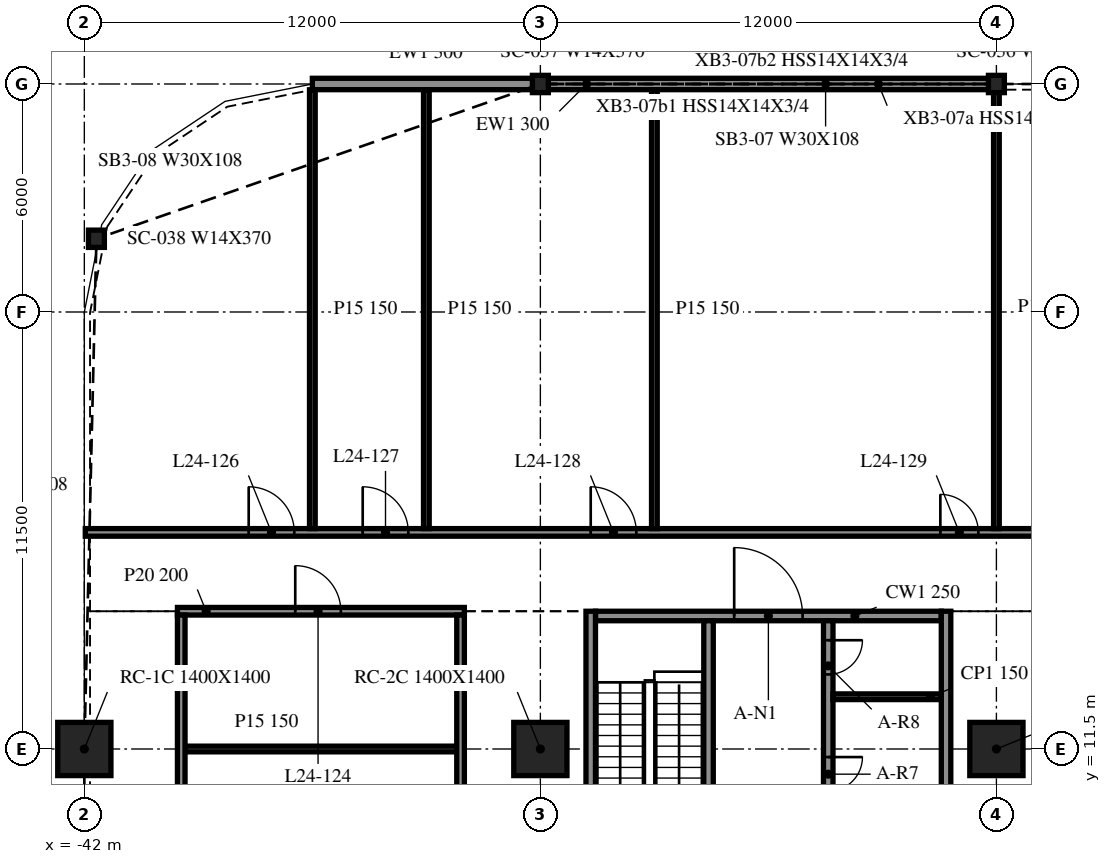
"""IFC4 building model, lengths in metres.
Left out: names, types, materials, properties, quantities, classifications, styles, units other than length and angle.
Written with IfcOpenShell. Run it as: python <this file> out.ifc"""

import sys

from ifc_helpers import new_model, si_unit, direction, frame, frame_2d, origin, origin_2d, place, context, subcontext, project, spatial, rectangle, i_section, extrude, element, fill, save


model = new_model("IFC4")
c1 = context("Model", 3, precision=1e-05, world=origin(), true_north=direction((0.0, 1.0)))
c2 = subcontext(c1, "Body", "Model", "MODEL_VIEW")
j1 = project(units=[si_unit("LENGTHUNIT", "METRE"), si_unit("PLANEANGLEUNIT", "RADIAN")], contexts=[c1])
p1 = place(None, origin())
s1 = spatial("IfcSite", under=j1, at=p1, CompositionType="ELEMENT")
p2 = place(p1, origin())
s2 = spatial("IfcBuilding", under=s1, at=p2, CompositionType="ELEMENT")
p3 = place(p2, frame((0.0, 0.0, 105.3)))
s3 = spatial("IfcBuildingStorey", under=s2, at=p3, CompositionType="ELEMENT", Elevation=105.3)
for number, where, z_axis, x_axis in (
    (1, (-42.0, 11.5, -0.34), (0.0, 0.0, 1.0), (1.0, 0.0, 0.0)),
    (2, (-30.0, 11.5, -0.34), (0.0, 0.0, 1.0), (1.0, 0.0, 0.0)),
    (3, (-18.0, 11.5, -0.34), (0.0, 0.0, 1.0), (1.0, 0.0, 0.0)),
):
    element("IfcColumn", number, at=place(p3, frame(where, z_axis=z_axis, x_axis=x_axis)), inside=s3, PredefinedType="COLUMN", context=c2, shape_type="SweptSolid", body=[
        extrude(rectangle(XDim=1.4, YDim=1.4, at=origin_2d()), origin(), (0.0, 0.0, 1.0), 4.1),
    ])
for number, where, z_axis, x_axis in (
    (4, (-18.0, 29.0, -0.34), (0.0, 0.0, 1.0), (1.0, 0.0, 0.0)),
    (5, (-30.0, 29.0, -0.34), (0.0, 0.0, 1.0), (1.0, 0.0, 0.0)),
    (6, (-41.682, 24.927, -0.34), (0.0, 0.0, 1.0), (1.0, 0.0, 0.0)),
):
    element("IfcColumn", number, at=place(p3, frame(where, z_axis=z_axis, x_axis=x_axis)), inside=s3, PredefinedType="COLUMN", context=c2, shape_type="SweptSolid", body=[
        extrude(i_section(OverallWidth=0.419, OverallDepth=0.455, WebThickness=0.042, FlangeThickness=0.068, at=origin_2d()), origin(), (0.0, 0.0, 1.0), 4.1),
    ])
p4 = place(p3, frame((-18.021, 29.0, 0.0), z_axis=(0.0, 0.0, 1.0), x_axis=(-1.0, 0.0, 0.0)))
e7 = element("IfcWall", 7, at=p4, inside=s3, PredefinedType="NOTDEFINED", context=c2, shape_type="SweptSolid", body=[
    extrude(rectangle(XDim=11.958, YDim=0.3, at=frame_2d((5.979, 0.0))), origin(), (0.0, 0.0, 1.0), 3.003),
])
p5 = place(p3, frame((-30.021, 29.0, 0.0), z_axis=(0.0, 0.0, 1.0), x_axis=(-1.0, 0.0, 0.0)))
e8 = element("IfcWall", 8, at=p5, inside=s3, PredefinedType="NOTDEFINED", context=c2, shape_type="SweptSolid", body=[
    extrude(rectangle(XDim=5.979, YDim=0.3, at=frame_2d((2.99, 0.0))), origin(), (0.0, 0.0, 1.0), 3.003),
])
for number, where, z_axis, x_axis in (
    (9, (-28.675, 15.125, 0.0), (0.0, 0.0, 1.0), (0.0, -1.0, 0.0)),
    (10, (-19.325, -9.125, 0.0), (0.0, 0.0, 1.0), (0.0, 1.0, 0.0)),
):
    element("IfcWall", number, at=place(p3, frame(where, z_axis=z_axis, x_axis=x_axis)), inside=s3, PredefinedType="SOLIDWALL", context=c2, shape_type="SweptSolid", body=[
        extrude(rectangle(XDim=24.25, YDim=0.25, at=frame_2d((12.125, 0.0))), origin(), (0.0, 0.0, 1.0), 3.76),
    ])
p6 = place(p3, frame((-28.55, 15.0, 0.0), z_axis=(0.0, 0.0, 1.0), x_axis=(1.0, 0.0, 0.0)))
e11 = element("IfcWall", 11, at=p6, inside=s3, PredefinedType="SOLIDWALL", context=c2, shape_type="SweptSolid", body=[
    extrude(rectangle(XDim=9.1, YDim=0.25, at=frame_2d((4.55, 0.0))), origin(), (0.0, 0.0, 1.0), 3.76),
])
p7 = place(p6, frame((3.65, 0.0, 0.0)))
e12 = element("IfcOpeningElement", 12, at=p7, cuts=e11, PredefinedType="OPENING", context=c2, shape_type="SweptSolid", body=[
    extrude(rectangle(XDim=1.8, YDim=2.1, at=frame_2d((0.9, 1.05))), frame((0.0, 0.135, 0.0), z_axis=(0.0, -1.0, 0.0), x_axis=(1.0, 0.0, 0.0)), (0.0, 0.0, 1.0), 0.27),
])
p8 = place(p3, frame((-25.575, 14.875, 0.0), z_axis=(0.0, 0.0, 1.0), x_axis=(0.0, -1.0, 0.0)))
e13 = element("IfcWall", 13, at=p8, inside=s3, PredefinedType="SOLIDWALL", context=c2, shape_type="SweptSolid", body=[
    extrude(rectangle(XDim=6.25, YDim=0.25, at=frame_2d((3.125, 0.0))), origin(), (0.0, 0.0, 1.0), 3.76),
])
p9 = place(p8, frame((4.85, 0.0, 0.0)))
e14 = element("IfcOpeningElement", 14, at=p9, cuts=e13, PredefinedType="OPENING", context=c2, shape_type="SweptSolid", body=[
    extrude(rectangle(XDim=1.0, YDim=2.1, at=frame_2d((0.5, 1.05))), frame((0.0, 0.135, 0.0), z_axis=(0.0, -1.0, 0.0), x_axis=(1.0, 0.0, 0.0)), (0.0, 0.0, 1.0), 0.27),
])
p10 = place(p3, frame((-22.425, 14.875, 0.0), z_axis=(0.0, 0.0, 1.0), x_axis=(0.0, -1.0, 0.0)))
e15 = element("IfcWall", 15, at=p10, inside=s3, PredefinedType="SOLIDWALL", context=c2, shape_type="SweptSolid", body=[
    extrude(rectangle(XDim=23.75, YDim=0.25, at=frame_2d((11.875, 0.0))), origin(), (0.0, 0.0, 1.0), 3.76),
])
p11 = place(p10, frame((15.45, 0.0, 0.0)))
e16 = element("IfcOpeningElement", 16, at=p11, cuts=e15, PredefinedType="OPENING", context=c2, shape_type="SweptSolid", body=[
    extrude(rectangle(XDim=1.1, YDim=2.1, at=frame_2d((0.55, 1.05))), frame((0.0, 0.135, 0.0), z_axis=(0.0, -1.0, 0.0), x_axis=(1.0, 0.0, 0.0)), (0.0, 0.0, 1.0), 0.27),
])
p12 = place(p10, frame((12.7, 0.0, 0.0)))
e17 = element("IfcOpeningElement", 17, at=p12, cuts=e15, PredefinedType="OPENING", context=c2, shape_type="SweptSolid", body=[
    extrude(rectangle(XDim=1.1, YDim=2.1, at=frame_2d((0.55, 1.05))), frame((0.0, 0.135, 0.0), z_axis=(0.0, -1.0, 0.0), x_axis=(1.0, 0.0, 0.0)), (0.0, 0.0, 1.0), 0.27),
])
p13 = place(p10, frame((22.337, 0.0, 0.0)))
e18 = element("IfcOpeningElement", 18, at=p13, cuts=e15, PredefinedType="OPENING", context=c2, shape_type="SweptSolid", body=[
    extrude(rectangle(XDim=0.9, YDim=2.1, at=frame_2d((0.45, 1.05))), frame((0.0, 0.135, 0.0), z_axis=(0.0, -1.0, 0.0), x_axis=(1.0, 0.0, 0.0)), (0.0, 0.0, 1.0), 0.27),
])
p14 = place(p10, frame((20.3, 0.0, 0.0)))
e19 = element("IfcOpeningElement", 19, at=p14, cuts=e15, PredefinedType="OPENING", context=c2, shape_type="SweptSolid", body=[
    extrude(rectangle(XDim=0.9, YDim=2.1, at=frame_2d((0.45, 1.05))), frame((0.0, 0.135, 0.0), z_axis=(0.0, -1.0, 0.0), x_axis=(1.0, 0.0, 0.0)), (0.0, 0.0, 1.0), 0.27),
])
p15 = place(p10, frame((18.262, 0.0, 0.0)))
e20 = element("IfcOpeningElement", 20, at=p15, cuts=e15, PredefinedType="OPENING", context=c2, shape_type="SweptSolid", body=[
    extrude(rectangle(XDim=0.9, YDim=2.1, at=frame_2d((0.45, 1.05))), frame((0.0, 0.135, 0.0), z_axis=(0.0, -1.0, 0.0), x_axis=(1.0, 0.0, 0.0)), (0.0, 0.0, 1.0), 0.27),
])
p16 = place(p10, frame((3.587, 0.0, 0.0)))
e21 = element("IfcOpeningElement", 21, at=p16, cuts=e15, PredefinedType="OPENING", context=c2, shape_type="SweptSolid", body=[
    extrude(rectangle(XDim=0.9, YDim=2.1, at=frame_2d((0.45, 1.05))), frame((0.0, 0.135, 0.0), z_axis=(0.0, -1.0, 0.0), x_axis=(1.0, 0.0, 0.0)), (0.0, 0.0, 1.0), 0.27),
])
p17 = place(p10, frame((0.512, 0.0, 0.0)))
e22 = element("IfcOpeningElement", 22, at=p17, cuts=e15, PredefinedType="OPENING", context=c2, shape_type="SweptSolid", body=[
    extrude(rectangle(XDim=0.9, YDim=2.1, at=frame_2d((0.45, 1.05))), frame((0.0, 0.135, 0.0), z_axis=(0.0, -1.0, 0.0), x_axis=(1.0, 0.0, 0.0)), (0.0, 0.0, 1.0), 0.27),
])
p18 = place(p3, frame((-22.3, 12.875, 0.0), z_axis=(0.0, 0.0, 1.0), x_axis=(1.0, 0.0, 0.0)))
e23 = element("IfcWall", 23, at=p18, inside=s3, PredefinedType="PARTITIONING", context=c2, shape_type="SweptSolid", body=[
    extrude(rectangle(XDim=2.85, YDim=0.15, at=frame_2d((1.425, 0.0))), origin(), (0.0, 0.0, 1.0), 3.76),
])
p19 = place(p3, frame((-39.35, 11.5, 0.0), z_axis=(0.0, 0.0, 1.0), x_axis=(1.0, 0.0, 0.0)))
e24 = element("IfcWall", 24, at=p19, inside=s3, PredefinedType="PARTITIONING", context=c2, shape_type="SweptSolid", body=[
    extrude(rectangle(XDim=7.15, YDim=0.15, at=frame_2d((3.575, 0.0))), origin(), (0.0, 0.0, 1.0), 3.76),
])
p20 = place(p3, frame((-39.55, 15.125, 0.0), z_axis=(0.0, 0.0, 1.0), x_axis=(1.0, 0.0, 0.0)))
e25 = element("IfcWall", 25, at=p20, inside=s3, PredefinedType="PARTITIONING", context=c2, shape_type="SweptSolid", body=[
    extrude(rectangle(XDim=7.55, YDim=0.2, at=frame_2d((3.775, 0.0))), origin(), (0.0, 0.0, 1.0), 3.76),
])
p21 = place(p20, frame((3.1, 0.0, 0.0)))
e26 = element("IfcOpeningElement", 26, at=p21, cuts=e25, PredefinedType="OPENING", context=c2, shape_type="SweptSolid", body=[
    extrude(rectangle(XDim=1.2, YDim=2.1, at=frame_2d((0.6, 1.05))), frame((0.0, 0.11, 0.0), z_axis=(0.0, -1.0, 0.0), x_axis=(1.0, 0.0, 0.0)), (0.0, 0.0, 1.0), 0.22),
])
p22 = place(p3, frame((-41.975, 17.2, 0.0), z_axis=(0.0, 0.0, 1.0), x_axis=(1.0, 0.0, 0.0)))
e27 = element("IfcWall", 27, at=p22, inside=s3, PredefinedType="PARTITIONING", context=c2, shape_type="SweptSolid", body=[
    extrude(rectangle(XDim=95.95, YDim=0.2, at=frame_2d((47.975, 0.0))), origin(), (0.0, 0.0, 1.0), 3.76),
])
p23 = place(p22, frame((4.3, 0.0, 0.0)))
e28 = element("IfcOpeningElement", 28, at=p23, cuts=e27, PredefinedType="OPENING", context=c2, shape_type="SweptSolid", body=[
    extrude(rectangle(XDim=1.2, YDim=2.1, at=frame_2d((0.6, 1.05))), frame((0.0, 0.11, 0.0), z_axis=(0.0, -1.0, 0.0), x_axis=(1.0, 0.0, 0.0)), (0.0, 0.0, 1.0), 0.22),
])
p24 = place(p22, frame((7.3, 0.0, 0.0)))
e29 = element("IfcOpeningElement", 29, at=p24, cuts=e27, PredefinedType="OPENING", context=c2, shape_type="SweptSolid", body=[
    extrude(rectangle(XDim=1.2, YDim=2.1, at=frame_2d((0.6, 1.05))), frame((0.0, 0.11, 0.0), z_axis=(0.0, -1.0, 0.0), x_axis=(1.0, 0.0, 0.0)), (0.0, 0.0, 1.0), 0.22),
])
p25 = place(p22, frame((13.3, 0.0, 0.0)))
e30 = element("IfcOpeningElement", 30, at=p25, cuts=e27, PredefinedType="OPENING", context=c2, shape_type="SweptSolid", body=[
    extrude(rectangle(XDim=1.2, YDim=2.1, at=frame_2d((0.6, 1.05))), frame((0.0, 0.11, 0.0), z_axis=(0.0, -1.0, 0.0), x_axis=(1.0, 0.0, 0.0)), (0.0, 0.0, 1.0), 0.22),
])
p26 = place(p22, frame((22.5, 0.0, 0.0)))
e31 = element("IfcOpeningElement", 31, at=p26, cuts=e27, PredefinedType="OPENING", context=c2, shape_type="SweptSolid", body=[
    extrude(rectangle(XDim=1.0, YDim=2.1, at=frame_2d((0.5, 1.05))), frame((0.0, 0.11, 0.0), z_axis=(0.0, -1.0, 0.0), x_axis=(1.0, 0.0, 0.0)), (0.0, 0.0, 1.0), 0.22),
])
p27 = place(p22, frame((28.5, 0.0, 0.0)))
e32 = element("IfcOpeningElement", 32, at=p27, cuts=e27, PredefinedType="OPENING", context=c2, shape_type="SweptSolid", body=[
    extrude(rectangle(XDim=1.0, YDim=2.1, at=frame_2d((0.5, 1.05))), frame((0.0, 0.11, 0.0), z_axis=(0.0, -1.0, 0.0), x_axis=(1.0, 0.0, 0.0)), (0.0, 0.0, 1.0), 0.22),
])
p28 = place(p22, frame((34.5, 0.0, 0.0)))
e33 = element("IfcOpeningElement", 33, at=p28, cuts=e27, PredefinedType="OPENING", context=c2, shape_type="SweptSolid", body=[
    extrude(rectangle(XDim=1.0, YDim=2.1, at=frame_2d((0.5, 1.05))), frame((0.0, 0.11, 0.0), z_axis=(0.0, -1.0, 0.0), x_axis=(1.0, 0.0, 0.0)), (0.0, 0.0, 1.0), 0.22),
])
p29 = place(p22, frame((37.3, 0.0, 0.0)))
e34 = element("IfcOpeningElement", 34, at=p29, cuts=e27, PredefinedType="OPENING", context=c2, shape_type="SweptSolid", body=[
    extrude(rectangle(XDim=1.2, YDim=2.1, at=frame_2d((0.6, 1.05))), frame((0.0, 0.11, 0.0), z_axis=(0.0, -1.0, 0.0), x_axis=(1.0, 0.0, 0.0)), (0.0, 0.0, 1.0), 0.22),
])
p30 = place(p22, frame((43.3, 0.0, 0.0)))
e35 = element("IfcOpeningElement", 35, at=p30, cuts=e27, PredefinedType="OPENING", context=c2, shape_type="SweptSolid", body=[
    extrude(rectangle(XDim=1.2, YDim=2.1, at=frame_2d((0.6, 1.05))), frame((0.0, 0.11, 0.0), z_axis=(0.0, -1.0, 0.0), x_axis=(1.0, 0.0, 0.0)), (0.0, 0.0, 1.0), 0.22),
])
p31 = place(p22, frame((47.3, 0.0, 0.0)))
e36 = element("IfcOpeningElement", 36, at=p31, cuts=e27, PredefinedType="OPENING", context=c2, shape_type="SweptSolid", body=[
    extrude(rectangle(XDim=1.2, YDim=2.1, at=frame_2d((0.6, 1.05))), frame((0.0, 0.11, 0.0), z_axis=(0.0, -1.0, 0.0), x_axis=(1.0, 0.0, 0.0)), (0.0, 0.0, 1.0), 0.22),
])
p32 = place(p22, frame((54.1, 0.0, 0.0)))
e37 = element("IfcOpeningElement", 37, at=p32, cuts=e27, PredefinedType="OPENING", context=c2, shape_type="SweptSolid", body=[
    extrude(rectangle(XDim=1.0, YDim=2.1, at=frame_2d((0.5, 1.05))), frame((0.0, 0.11, 0.0), z_axis=(0.0, -1.0, 0.0), x_axis=(1.0, 0.0, 0.0)), (0.0, 0.0, 1.0), 0.22),
])
p33 = place(p22, frame((60.1, 0.0, 0.0)))
e38 = element("IfcOpeningElement", 38, at=p33, cuts=e27, PredefinedType="OPENING", context=c2, shape_type="SweptSolid", body=[
    extrude(rectangle(XDim=1.0, YDim=2.1, at=frame_2d((0.5, 1.05))), frame((0.0, 0.11, 0.0), z_axis=(0.0, -1.0, 0.0), x_axis=(1.0, 0.0, 0.0)), (0.0, 0.0, 1.0), 0.22),
])
p34 = place(p22, frame((66.1, 0.0, 0.0)))
e39 = element("IfcOpeningElement", 39, at=p34, cuts=e27, PredefinedType="OPENING", context=c2, shape_type="SweptSolid", body=[
    extrude(rectangle(XDim=1.0, YDim=2.1, at=frame_2d((0.5, 1.05))), frame((0.0, 0.11, 0.0), z_axis=(0.0, -1.0, 0.0), x_axis=(1.0, 0.0, 0.0)), (0.0, 0.0, 1.0), 0.22),
])
p35 = place(p22, frame((69.1, 0.0, 0.0)))
e40 = element("IfcOpeningElement", 40, at=p35, cuts=e27, PredefinedType="OPENING", context=c2, shape_type="SweptSolid", body=[
    extrude(rectangle(XDim=1.2, YDim=2.1, at=frame_2d((0.6, 1.05))), frame((0.0, 0.11, 0.0), z_axis=(0.0, -1.0, 0.0), x_axis=(1.0, 0.0, 0.0)), (0.0, 0.0, 1.0), 0.22),
])
p36 = place(p22, frame((75.1, 0.0, 0.0)))
e41 = element("IfcOpeningElement", 41, at=p36, cuts=e27, PredefinedType="OPENING", context=c2, shape_type="SweptSolid", body=[
    extrude(rectangle(XDim=1.2, YDim=2.1, at=frame_2d((0.6, 1.05))), frame((0.0, 0.11, 0.0), z_axis=(0.0, -1.0, 0.0), x_axis=(1.0, 0.0, 0.0)), (0.0, 0.0, 1.0), 0.22),
])
p37 = place(p22, frame((84.1, 0.0, 0.0)))
e42 = element("IfcOpeningElement", 42, at=p37, cuts=e27, PredefinedType="OPENING", context=c2, shape_type="SweptSolid", body=[
    extrude(rectangle(XDim=1.2, YDim=2.1, at=frame_2d((0.6, 1.05))), frame((0.0, 0.11, 0.0), z_axis=(0.0, -1.0, 0.0), x_axis=(1.0, 0.0, 0.0)), (0.0, 0.0, 1.0), 0.22),
])
p38 = place(p22, frame((90.1, 0.0, 0.0)))
e43 = element("IfcOpeningElement", 43, at=p38, cuts=e27, PredefinedType="OPENING", context=c2, shape_type="SweptSolid", body=[
    extrude(rectangle(XDim=1.0, YDim=2.1, at=frame_2d((0.5, 1.05))), frame((0.0, 0.11, 0.0), z_axis=(0.0, -1.0, 0.0), x_axis=(1.0, 0.0, 0.0)), (0.0, 0.0, 1.0), 0.22),
])
p39 = place(p3, frame((-39.45, -9.025, 0.0), z_axis=(0.0, 0.0, 1.0), x_axis=(0.0, 1.0, 0.0)))
e44 = element("IfcWall", 44, at=p39, inside=s3, PredefinedType="PARTITIONING", context=c2, shape_type="SweptSolid", body=[
    extrude(rectangle(XDim=24.05, YDim=0.2, at=frame_2d((12.025, 0.0))), origin(), (0.0, 0.0, 1.0), 3.76),
])
p40 = place(p39, frame((11.5, 0.0, 0.0)))
e45 = element("IfcOpeningElement", 45, at=p40, cuts=e44, PredefinedType="OPENING", context=c2, shape_type="SweptSolid", body=[
    extrude(rectangle(XDim=1.2, YDim=2.1, at=frame_2d((0.6, 1.05))), frame((0.0, 0.11, 0.0), z_axis=(0.0, -1.0, 0.0), x_axis=(1.0, 0.0, 0.0)), (0.0, 0.0, 1.0), 0.22),
])
p41 = place(p3, frame((-36.0, 17.3, 0.0), z_axis=(0.0, 0.0, 1.0), x_axis=(0.0, 1.0, 0.0)))
e46 = element("IfcWall", 46, at=p41, inside=s3, PredefinedType="PARTITIONING", context=c2, shape_type="SweptSolid", body=[
    extrude(rectangle(XDim=11.547, YDim=0.15, at=frame_2d((5.773, 0.0))), origin(), (0.0, 0.0, 1.0), 3.76),
])
p42 = place(p3, frame((-33.0, 17.3, 0.0), z_axis=(0.0, 0.0, 1.0), x_axis=(0.0, 1.0, 0.0)))
e47 = element("IfcWall", 47, at=p42, inside=s3, PredefinedType="PARTITIONING", context=c2, shape_type="SweptSolid", body=[
    extrude(rectangle(XDim=11.55, YDim=0.15, at=frame_2d((5.775, 0.0))), origin(), (0.0, 0.0, 1.0), 3.76),
])
p43 = place(p3, frame((-32.1, -9.025, 0.0), z_axis=(0.0, 0.0, 1.0), x_axis=(0.0, 1.0, 0.0)))
e48 = element("IfcWall", 48, at=p43, inside=s3, PredefinedType="PARTITIONING", context=c2, shape_type="SweptSolid", body=[
    extrude(rectangle(XDim=24.05, YDim=0.2, at=frame_2d((12.025, 0.0))), origin(), (0.0, 0.0, 1.0), 3.76),
])
p44 = place(p3, frame((-27.0, 17.3, 0.0), z_axis=(0.0, 0.0, 1.0), x_axis=(0.0, 1.0, 0.0)))
e49 = element("IfcWall", 49, at=p44, inside=s3, PredefinedType="PARTITIONING", context=c2, shape_type="SweptSolid", body=[
    extrude(rectangle(XDim=11.55, YDim=0.15, at=frame_2d((5.775, 0.0))), origin(), (0.0, 0.0, 1.0), 3.76),
])
p45 = place(p3, frame((-18.0, 17.3, 0.0), z_axis=(0.0, 0.0, 1.0), x_axis=(0.0, 1.0, 0.0)))
e50 = element("IfcWall", 50, at=p45, inside=s3, PredefinedType="PARTITIONING", context=c2, shape_type="SweptSolid", body=[
    extrude(rectangle(XDim=11.675, YDim=0.15, at=frame_2d((5.837, 0.0))), origin(), (0.0, 0.0, 1.0), 3.76),
])
p46 = place(p7, origin())
e51 = element("IfcDoor", 51, at=p46, inside=s3, OperationType="DOUBLE_DOOR_SINGLE_SWING", PredefinedType="DOOR", context=c2, shape_type="SweptSolid", body=[
    extrude(rectangle(XDim=1.8, YDim=2.1, at=frame_2d((0.9, 1.05))), frame((0.0, 0.025, 0.0), z_axis=(0.0, -1.0, 0.0), x_axis=(1.0, 0.0, 0.0)), (0.0, 0.0, 1.0), 0.05),
])
fill(e12, e51)
p47 = place(p16, origin())
e52 = element("IfcDoor", 52, at=p47, inside=s3, OperationType="SINGLE_SWING_LEFT", PredefinedType="DOOR", context=c2, shape_type="SweptSolid", body=[
    extrude(rectangle(XDim=0.9, YDim=2.1, at=frame_2d((0.45, 1.05))), frame((0.0, 0.025, 0.0), z_axis=(0.0, -1.0, 0.0), x_axis=(1.0, 0.0, 0.0)), (0.0, 0.0, 1.0), 0.05),
])
fill(e21, e52)
p48 = place(p17, origin())
e53 = element("IfcDoor", 53, at=p48, inside=s3, OperationType="SINGLE_SWING_RIGHT", PredefinedType="DOOR", context=c2, shape_type="SweptSolid", body=[
    extrude(rectangle(XDim=0.9, YDim=2.1, at=frame_2d((0.45, 1.05))), frame((0.0, 0.025, 0.0), z_axis=(0.0, -1.0, 0.0), x_axis=(1.0, 0.0, 0.0)), (0.0, 0.0, 1.0), 0.05),
])
fill(e22, e53)
p49 = place(p21, origin())
e54 = element("IfcDoor", 54, at=p49, inside=s3, OperationType="SINGLE_SWING_RIGHT", PredefinedType="DOOR", context=c2, shape_type="SweptSolid", body=[
    extrude(rectangle(XDim=1.2, YDim=2.1, at=frame_2d((0.6, 1.05))), frame((0.0, 0.025, 0.0), z_axis=(0.0, -1.0, 0.0), x_axis=(1.0, 0.0, 0.0)), (0.0, 0.0, 1.0), 0.05),
])
fill(e26, e54)
p50 = place(p23, origin())
e55 = element("IfcDoor", 55, at=p50, inside=s3, OperationType="SINGLE_SWING_LEFT", PredefinedType="DOOR", context=c2, shape_type="SweptSolid", body=[
    extrude(rectangle(XDim=1.2, YDim=2.1, at=frame_2d((0.6, 1.05))), frame((0.0, 0.025, 0.0), z_axis=(0.0, -1.0, 0.0), x_axis=(1.0, 0.0, 0.0)), (0.0, 0.0, 1.0), 0.05),
])
fill(e28, e55)
p51 = place(p24, origin())
e56 = element("IfcDoor", 56, at=p51, inside=s3, OperationType="SINGLE_SWING_LEFT", PredefinedType="DOOR", context=c2, shape_type="SweptSolid", body=[
    extrude(rectangle(XDim=1.2, YDim=2.1, at=frame_2d((0.6, 1.05))), frame((0.0, 0.025, 0.0), z_axis=(0.0, -1.0, 0.0), x_axis=(1.0, 0.0, 0.0)), (0.0, 0.0, 1.0), 0.05),
])
fill(e29, e56)
p52 = place(p25, origin())
e57 = element("IfcDoor", 57, at=p52, inside=s3, OperationType="SINGLE_SWING_LEFT", PredefinedType="DOOR", context=c2, shape_type="SweptSolid", body=[
    extrude(rectangle(XDim=1.2, YDim=2.1, at=frame_2d((0.6, 1.05))), frame((0.0, 0.025, 0.0), z_axis=(0.0, -1.0, 0.0), x_axis=(1.0, 0.0, 0.0)), (0.0, 0.0, 1.0), 0.05),
])
fill(e30, e57)
p53 = place(p26, origin())
e58 = element("IfcDoor", 58, at=p53, inside=s3, OperationType="SINGLE_SWING_LEFT", PredefinedType="DOOR", context=c2, shape_type="SweptSolid", body=[
    extrude(rectangle(XDim=1.0, YDim=2.1, at=frame_2d((0.5, 1.05))), frame((0.0, 0.025, 0.0), z_axis=(0.0, -1.0, 0.0), x_axis=(1.0, 0.0, 0.0)), (0.0, 0.0, 1.0), 0.05),
])
fill(e31, e58)
save(model, sys.argv[1])
